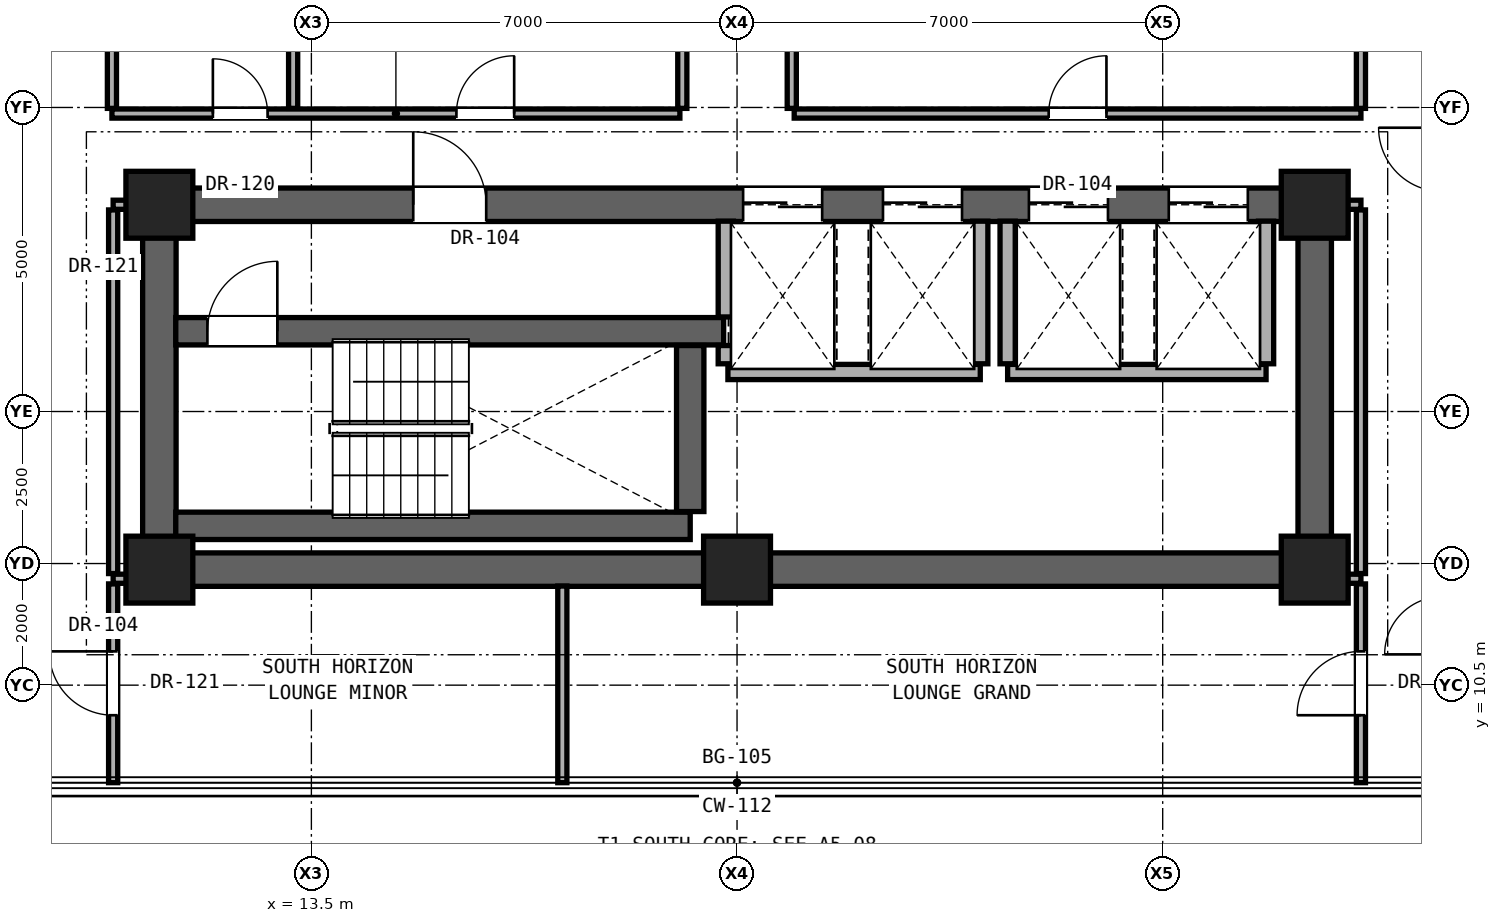
"""IFC4 building model, lengths in metres.
Left out: names, types, materials, properties, quantities, classifications, styles, units other than length and angle.
Written with IfcOpenShell. Run it as: python <this file> out.ifc"""

import sys

from ifc_helpers import new_model, si_unit, direction, frame, frame_2d, origin, origin_2d, place, context, subcontext, project, spatial, rectangle, extrude, element, fill, save


model = new_model("IFC4")
c1 = context("Model", 3, precision=1e-05, world=origin(), true_north=direction((0.0, 1.0)))
c2 = subcontext(c1, "Body", "Model", "MODEL_VIEW")
j1 = project(units=[si_unit("LENGTHUNIT", "METRE"), si_unit("PLANEANGLEUNIT", "RADIAN")], contexts=[c1])
p1 = place(None, origin())
s1 = spatial("IfcSite", under=j1, at=p1, CompositionType="ELEMENT")
p2 = place(p1, origin())
s2 = spatial("IfcBuilding", under=s1, at=p2, CompositionType="ELEMENT")
p3 = place(p2, frame((0.0, 0.0, 144.5)))
s3 = spatial("IfcBuildingStorey", under=s2, at=p3, CompositionType="ELEMENT", Elevation=144.5)
for number, where, z_axis, x_axis in (
    (1, (11.0, 12.4, 0.0), (0.0, 0.0, 1.0), (1.0, 0.0, 0.0)),
    (2, (20.5, 12.4, 0.0), (0.0, 0.0, 1.0), (1.0, 0.0, 0.0)),
    (3, (30.0, 12.4, 0.0), (0.0, 0.0, 1.0), (1.0, 0.0, 0.0)),
    (4, (11.0, 18.4, 0.0), (0.0, 0.0, 1.0), (1.0, 0.0, 0.0)),
    (5, (30.0, 18.4, 0.0), (0.0, 0.0, 1.0), (1.0, 0.0, 0.0)),
):
    element("IfcColumn", number, at=place(p3, frame(where, z_axis=z_axis, x_axis=x_axis)), inside=s3, PredefinedType="COLUMN", context=c2, shape_type="SweptSolid", body=[
        extrude(rectangle(XDim=1.1, YDim=1.1, at=origin_2d()), origin(), (0.0, 0.0, 1.0), 3.3),
    ])
p4 = place(p3, frame((11.0, 12.4, 0.0), z_axis=(0.0, 0.0, 1.0), x_axis=(1.0, 0.0, 0.0)))
e6 = element("IfcWall", 6, at=p4, inside=s3, PredefinedType="SHEAR", context=c2, shape_type="SweptSolid", body=[
    extrude(rectangle(XDim=19.0, YDim=0.55, at=frame_2d((9.5, 0.0))), origin(), (0.0, 0.0, 1.0), 2.94),
])
for number, where, z_axis, x_axis in (
    (7, (11.0, 12.4, 0.0), (0.0, 0.0, 1.0), (0.0, 1.0, 0.0)),
    (8, (30.0, 12.4, 0.0), (0.0, 0.0, 1.0), (0.0, 1.0, 0.0)),
):
    element("IfcWall", number, at=place(p3, frame(where, z_axis=z_axis, x_axis=x_axis)), inside=s3, PredefinedType="SHEAR", context=c2, shape_type="SweptSolid", body=[
        extrude(rectangle(XDim=6.0, YDim=0.55, at=frame_2d((3.0, 0.0))), origin(), (0.0, 0.0, 1.0), 2.94),
    ])
p5 = place(p3, frame((11.0, 18.4, 0.0), z_axis=(0.0, 0.0, 1.0), x_axis=(1.0, 0.0, 0.0)))
e9 = element("IfcWall", 9, at=p5, inside=s3, PredefinedType="SHEAR", context=c2, shape_type="SweptSolid", body=[
    extrude(rectangle(XDim=19.0, YDim=0.55, at=frame_2d((9.5, 0.0))), origin(), (0.0, 0.0, 1.0), 2.94),
])
p6 = place(p5, frame((4.175, 0.0, 0.0)))
e10 = element("IfcOpeningElement", 10, at=p6, cuts=e9, PredefinedType="OPENING", context=c2, shape_type="SweptSolid", body=[
    extrude(rectangle(XDim=1.2, YDim=2.25, at=frame_2d((0.6, 1.125))), frame((0.0, 0.285, 0.0), z_axis=(0.0, -1.0, 0.0), x_axis=(1.0, 0.0, 0.0)), (0.0, 0.0, 1.0), 0.57),
])
p7 = place(p5, frame((9.6, 0.0, 0.0)))
e11 = element("IfcOpeningElement", 11, at=p7, cuts=e9, PredefinedType="OPENING", context=c2, shape_type="SweptSolid", body=[
    extrude(rectangle(XDim=1.3, YDim=2.3, at=frame_2d((0.65, 1.15))), frame((0.0, 0.285, 0.0), z_axis=(0.0, -1.0, 0.0), x_axis=(1.0, 0.0, 0.0)), (0.0, 0.0, 1.0), 0.57),
])
p8 = place(p5, frame((11.9, 0.0, 0.0)))
e12 = element("IfcOpeningElement", 12, at=p8, cuts=e9, PredefinedType="OPENING", context=c2, shape_type="SweptSolid", body=[
    extrude(rectangle(XDim=1.3, YDim=2.3, at=frame_2d((0.65, 1.15))), frame((0.0, 0.285, 0.0), z_axis=(0.0, -1.0, 0.0), x_axis=(1.0, 0.0, 0.0)), (0.0, 0.0, 1.0), 0.57),
])
p9 = place(p5, frame((14.3, 0.0, 0.0)))
e13 = element("IfcOpeningElement", 13, at=p9, cuts=e9, PredefinedType="OPENING", context=c2, shape_type="SweptSolid", body=[
    extrude(rectangle(XDim=1.3, YDim=2.3, at=frame_2d((0.65, 1.15))), frame((0.0, 0.285, 0.0), z_axis=(0.0, -1.0, 0.0), x_axis=(1.0, 0.0, 0.0)), (0.0, 0.0, 1.0), 0.57),
])
p10 = place(p5, frame((16.6, 0.0, 0.0)))
e14 = element("IfcOpeningElement", 14, at=p10, cuts=e9, PredefinedType="OPENING", context=c2, shape_type="SweptSolid", body=[
    extrude(rectangle(XDim=1.3, YDim=2.3, at=frame_2d((0.65, 1.15))), frame((0.0, 0.285, 0.0), z_axis=(0.0, -1.0, 0.0), x_axis=(1.0, 0.0, 0.0)), (0.0, 0.0, 1.0), 0.57),
])
for number, where, z_axis, x_axis in (
    (15, (10.24, 12.25, 0.0), (0.0, 0.0, 1.0), (1.0, 0.0, 0.0)),
    (16, (30.27, 12.25, 0.0), (0.0, 0.0, 1.0), (1.0, 0.0, 0.0)),
):
    element("IfcWall", number, at=place(p3, frame(where, z_axis=z_axis, x_axis=x_axis)), inside=s3, PredefinedType="PARTITIONING", context=c2, shape_type="SweptSolid", body=[
        extrude(rectangle(XDim=0.49, YDim=0.15, at=frame_2d((0.245, 0.0))), origin(), (0.0, 0.0, 1.0), 2.94),
    ])
p11 = place(p3, frame((11.27, 13.12, 0.0), z_axis=(0.0, 0.0, 1.0), x_axis=(1.0, 0.0, 0.0)))
e17 = element("IfcWall", 17, at=p11, inside=s3, PredefinedType="SHEAR", context=c2, shape_type="SweptSolid", body=[
    extrude(rectangle(XDim=8.46, YDim=0.45, at=frame_2d((4.23, 0.0))), origin(), (0.0, 0.0, 1.0), 2.94),
])
p12 = place(p3, frame((20.35, 15.65, 0.0), z_axis=(0.0, 0.0, 1.0), x_axis=(1.0, 0.0, 0.0)))
e18 = element("IfcWall", 18, at=p12, inside=s3, PredefinedType="SOLIDWALL", context=c2, shape_type="SweptSolid", body=[
    extrude(rectangle(XDim=4.15, YDim=0.25, at=frame_2d((2.075, 0.0))), origin(), (0.0, 0.0, 1.0), 2.94),
])
p13 = place(p3, frame((24.95, 15.65, 0.0), z_axis=(0.0, 0.0, 1.0), x_axis=(1.0, 0.0, 0.0)))
e19 = element("IfcWall", 19, at=p13, inside=s3, PredefinedType="SOLIDWALL", context=c2, shape_type="SweptSolid", body=[
    extrude(rectangle(XDim=4.25, YDim=0.25, at=frame_2d((2.125, 0.0))), origin(), (0.0, 0.0, 1.0), 2.94),
])
p14 = place(p3, frame((11.27, 16.32, 0.0), z_axis=(0.0, 0.0, 1.0), x_axis=(1.0, 0.0, 0.0)))
e20 = element("IfcWall", 20, at=p14, inside=s3, PredefinedType="SHEAR", context=c2, shape_type="SweptSolid", body=[
    extrude(rectangle(XDim=9.01, YDim=0.45, at=frame_2d((4.505, 0.0))), origin(), (0.0, 0.0, 1.0), 2.94),
])
p15 = place(p14, frame((0.52, 0.0, 0.0)))
e21 = element("IfcOpeningElement", 21, at=p15, cuts=e20, PredefinedType="OPENING", context=c2, shape_type="SweptSolid", body=[
    extrude(rectangle(XDim=1.15, YDim=2.2, at=frame_2d((0.575, 1.1))), frame((0.0, 0.235, 0.0), z_axis=(0.0, -1.0, 0.0), x_axis=(1.0, 0.0, 0.0)), (0.0, 0.0, 1.0), 0.47),
])
for number, where, z_axis, x_axis in (
    (22, (10.24, 18.4, 0.0), (0.0, 0.0, 1.0), (1.0, 0.0, 0.0)),
    (23, (30.27, 18.4, 0.0), (0.0, 0.0, 1.0), (1.0, 0.0, 0.0)),
):
    element("IfcWall", number, at=place(p3, frame(where, z_axis=z_axis, x_axis=x_axis)), inside=s3, PredefinedType="PARTITIONING", context=c2, shape_type="SweptSolid", body=[
        extrude(rectangle(XDim=0.49, YDim=0.15, at=frame_2d((0.245, 0.0))), origin(), (0.0, 0.0, 1.0), 2.316),
    ])
p16 = place(p3, frame((10.22, 19.9, 0.0), z_axis=(0.0, 0.0, 1.0), x_axis=(1.0, 0.0, 0.0)))
e24 = element("IfcWall", 24, at=p16, inside=s3, PredefinedType="PARTITIONING", context=c2, shape_type="SweptSolid", body=[
    extrude(rectangle(XDim=9.34, YDim=0.15, at=frame_2d((4.67, 0.0))), origin(), (0.0, 0.0, 1.0), 2.316),
])
p17 = place(p16, frame((1.66, 0.0, 0.0)))
e25 = element("IfcOpeningElement", 25, at=p17, cuts=e24, PredefinedType="OPENING", context=c2, shape_type="SweptSolid", body=[
    extrude(rectangle(XDim=0.9, YDim=2.1, at=frame_2d((0.45, 1.05))), frame((0.0, 0.085, 0.0), z_axis=(0.0, -1.0, 0.0), x_axis=(1.0, 0.0, 0.0)), (0.0, 0.0, 1.0), 0.17),
])
p18 = place(p16, frame((5.665, 0.0, 0.0)))
e26 = element("IfcOpeningElement", 26, at=p18, cuts=e24, PredefinedType="OPENING", context=c2, shape_type="SweptSolid", body=[
    extrude(rectangle(XDim=0.95, YDim=2.15, at=frame_2d((0.475, 1.075))), frame((0.0, 0.085, 0.0), z_axis=(0.0, -1.0, 0.0), x_axis=(1.0, 0.0, 0.0)), (0.0, 0.0, 1.0), 0.17),
])
p19 = place(p3, frame((21.44, 19.9, 0.0), z_axis=(0.0, 0.0, 1.0), x_axis=(1.0, 0.0, 0.0)))
e27 = element("IfcWall", 27, at=p19, inside=s3, PredefinedType="PARTITIONING", context=c2, shape_type="SweptSolid", body=[
    extrude(rectangle(XDim=9.32, YDim=0.15, at=frame_2d((4.66, 0.0))), origin(), (0.0, 0.0, 1.0), 2.316),
])
p20 = place(p19, frame((4.185, 0.0, 0.0)))
e28 = element("IfcOpeningElement", 28, at=p20, cuts=e27, PredefinedType="OPENING", context=c2, shape_type="SweptSolid", body=[
    extrude(rectangle(XDim=0.95, YDim=2.15, at=frame_2d((0.475, 1.075))), frame((0.0, 0.085, 0.0), z_axis=(0.0, -1.0, 0.0), x_axis=(1.0, 0.0, 0.0)), (0.0, 0.0, 1.0), 0.17),
])
p21 = place(p3, frame((10.22, 19.985, 0.0), z_axis=(0.0, 0.0, 1.0), x_axis=(0.0, 1.0, 0.0)))
e29 = element("IfcWall", 29, at=p21, inside=s3, PredefinedType="PARTITIONING", context=c2, shape_type="SweptSolid", body=[
    extrude(rectangle(XDim=2.78, YDim=0.15, at=frame_2d((1.39, 0.0))), origin(), (0.0, 0.0, 1.0), 2.94),
])
p22 = place(p3, frame((10.24, 8.896, 0.0), z_axis=(0.0, 0.0, 1.0), x_axis=(0.0, 1.0, 0.0)))
e30 = element("IfcWall", 30, at=p22, inside=s3, PredefinedType="PARTITIONING", context=c2, shape_type="SweptSolid", body=[
    extrude(rectangle(XDim=3.269, YDim=0.15, at=frame_2d((1.635, 0.0))), origin(), (0.0, 0.0, 1.0), 2.94),
])
p23 = place(p22, frame((1.11, 0.0, 0.0)))
e31 = element("IfcOpeningElement", 31, at=p23, cuts=e30, PredefinedType="OPENING", context=c2, shape_type="SweptSolid", body=[
    extrude(rectangle(XDim=1.05, YDim=2.2, at=frame_2d((0.525, 1.1))), frame((0.0, 0.085, 0.0), z_axis=(0.0, -1.0, 0.0), x_axis=(1.0, 0.0, 0.0)), (0.0, 0.0, 1.0), 0.17),
])
p24 = place(p3, frame((10.24, 12.335, 0.0), z_axis=(0.0, 0.0, 1.0), x_axis=(0.0, 1.0, 0.0)))
e32 = element("IfcWall", 32, at=p24, inside=s3, PredefinedType="PARTITIONING", context=c2, shape_type="SweptSolid", body=[
    extrude(rectangle(XDim=5.98, YDim=0.15, at=frame_2d((2.99, 0.0))), origin(), (0.0, 0.0, 1.0), 2.316),
])
p25 = place(p3, frame((13.2, 19.985, 0.0), z_axis=(0.0, 0.0, 1.0), x_axis=(0.0, 1.0, 0.0)))
e33 = element("IfcWall", 33, at=p25, inside=s3, PredefinedType="PARTITIONING", context=c2, shape_type="SweptSolid", body=[
    extrude(rectangle(XDim=2.78, YDim=0.15, at=frame_2d((1.39, 0.0))), origin(), (0.0, 0.0, 1.0), 2.94),
])
p26 = place(p3, frame((17.627, 8.896, 0.0), z_axis=(0.0, 0.0, 1.0), x_axis=(0.0, 1.0, 0.0)))
e34 = element("IfcWall", 34, at=p26, inside=s3, PredefinedType="PARTITIONING", context=c2, shape_type="SweptSolid", body=[
    extrude(rectangle(XDim=3.234, YDim=0.15, at=frame_2d((1.617, 0.0))), origin(), (0.0, 0.0, 1.0), 2.94),
])
p27 = place(p3, frame((19.6, 19.985, 0.0), z_axis=(0.0, 0.0, 1.0), x_axis=(0.0, 1.0, 0.0)))
e35 = element("IfcWall", 35, at=p27, inside=s3, PredefinedType="PARTITIONING", context=c2, shape_type="SweptSolid", body=[
    extrude(rectangle(XDim=5.53, YDim=0.15, at=frame_2d((2.765, 0.0))), origin(), (0.0, 0.0, 1.0), 2.316),
])
p28 = place(p3, frame((19.73, 13.355, 0.0), z_axis=(0.0, 0.0, 1.0), x_axis=(0.0, 1.0, 0.0)))
e36 = element("IfcWall", 36, at=p28, inside=s3, PredefinedType="SHEAR", context=c2, shape_type="SweptSolid", body=[
    extrude(rectangle(XDim=2.73, YDim=0.45, at=frame_2d((1.365, 0.0))), origin(), (0.0, 0.0, 1.0), 2.94),
])
p29 = place(p3, frame((20.315, 15.785, 0.0), z_axis=(0.0, 0.0, 1.0), x_axis=(0.0, 1.0, 0.0)))
e37 = element("IfcWall", 37, at=p29, inside=s3, PredefinedType="SOLIDWALL", context=c2, shape_type="SweptSolid", body=[
    extrude(rectangle(XDim=0.3, YDim=0.25, at=frame_2d((0.15, 0.0))), origin(), (0.0, 0.0, 1.0), 2.94),
])
p30 = place(p3, frame((20.315, 16.555, 0.0), z_axis=(0.0, 0.0, 1.0), x_axis=(0.0, 1.0, 0.0)))
e38 = element("IfcWall", 38, at=p30, inside=s3, PredefinedType="SOLIDWALL", context=c2, shape_type="SweptSolid", body=[
    extrude(rectangle(XDim=1.575, YDim=0.25, at=frame_2d((0.788, 0.0))), origin(), (0.0, 0.0, 1.0), 2.94),
])
p31 = place(p3, frame((21.4, 19.985, 0.0), z_axis=(0.0, 0.0, 1.0), x_axis=(0.0, 1.0, 0.0)))
e39 = element("IfcWall", 39, at=p31, inside=s3, PredefinedType="PARTITIONING", context=c2, shape_type="SweptSolid", body=[
    extrude(rectangle(XDim=5.53, YDim=0.15, at=frame_2d((2.765, 0.0))), origin(), (0.0, 0.0, 1.0), 2.316),
])
for number, where, z_axis, x_axis in (
    (40, (24.5, 15.785, 0.0), (0.0, 0.0, 1.0), (0.0, 1.0, 0.0)),
    (41, (24.95, 15.785, 0.0), (0.0, 0.0, 1.0), (0.0, 1.0, 0.0)),
    (42, (29.2, 15.785, 0.0), (0.0, 0.0, 1.0), (0.0, 1.0, 0.0)),
):
    element("IfcWall", number, at=place(p3, frame(where, z_axis=z_axis, x_axis=x_axis)), inside=s3, PredefinedType="SOLIDWALL", context=c2, shape_type="SweptSolid", body=[
        extrude(rectangle(XDim=2.345, YDim=0.25, at=frame_2d((1.172, 0.0))), origin(), (0.0, 0.0, 1.0), 2.94),
    ])
p32 = place(p3, frame((30.76, 8.896, 0.0), z_axis=(0.0, 0.0, 1.0), x_axis=(0.0, 1.0, 0.0)))
e43 = element("IfcWall", 43, at=p32, inside=s3, PredefinedType="PARTITIONING", context=c2, shape_type="SweptSolid", body=[
    extrude(rectangle(XDim=3.269, YDim=0.15, at=frame_2d((1.635, 0.0))), origin(), (0.0, 0.0, 1.0), 2.94),
])
p33 = place(p32, frame((1.11, 0.0, 0.0)))
e44 = element("IfcOpeningElement", 44, at=p33, cuts=e43, PredefinedType="OPENING", context=c2, shape_type="SweptSolid", body=[
    extrude(rectangle(XDim=1.05, YDim=2.2, at=frame_2d((0.525, 1.1))), frame((0.0, 0.085, 0.0), z_axis=(0.0, -1.0, 0.0), x_axis=(1.0, 0.0, 0.0)), (0.0, 0.0, 1.0), 0.17),
])
p34 = place(p3, frame((30.76, 12.335, 0.0), z_axis=(0.0, 0.0, 1.0), x_axis=(0.0, 1.0, 0.0)))
e45 = element("IfcWall", 45, at=p34, inside=s3, PredefinedType="PARTITIONING", context=c2, shape_type="SweptSolid", body=[
    extrude(rectangle(XDim=5.98, YDim=0.15, at=frame_2d((2.99, 0.0))), origin(), (0.0, 0.0, 1.0), 2.316),
])
p35 = place(p3, frame((30.76, 19.985, 0.0), z_axis=(0.0, 0.0, 1.0), x_axis=(0.0, 1.0, 0.0)))
e46 = element("IfcWall", 46, at=p35, inside=s3, PredefinedType="PARTITIONING", context=c2, shape_type="SweptSolid", body=[
    extrude(rectangle(XDim=5.53, YDim=0.15, at=frame_2d((2.765, 0.0))), origin(), (0.0, 0.0, 1.0), 2.316),
])
p36 = place(p6, origin())
e47 = element("IfcDoor", 47, at=p36, inside=s3, OperationType="SINGLE_SWING_LEFT", PredefinedType="DOOR", context=c2, shape_type="SweptSolid", body=[
    extrude(rectangle(XDim=1.2, YDim=2.25, at=frame_2d((0.6, 1.125))), frame((0.0, 0.025, 0.0), z_axis=(0.0, -1.0, 0.0), x_axis=(1.0, 0.0, 0.0)), (0.0, 0.0, 1.0), 0.05),
])
fill(e10, e47)
p37 = place(p15, origin())
e48 = element("IfcDoor", 48, at=p37, inside=s3, OperationType="SINGLE_SWING_RIGHT", PredefinedType="DOOR", context=c2, shape_type="SweptSolid", body=[
    extrude(rectangle(XDim=1.15, YDim=2.2, at=frame_2d((0.575, 1.1))), frame((0.0, 0.025, 0.0), z_axis=(0.0, -1.0, 0.0), x_axis=(1.0, 0.0, 0.0)), (0.0, 0.0, 1.0), 0.05),
])
fill(e21, e48)
p38 = place(p17, origin())
e49 = element("IfcDoor", 49, at=p38, inside=s3, OperationType="SINGLE_SWING_LEFT", PredefinedType="DOOR", context=c2, shape_type="SweptSolid", body=[
    extrude(rectangle(XDim=0.9, YDim=2.1, at=frame_2d((0.45, 1.05))), frame((0.0, 0.025, 0.0), z_axis=(0.0, -1.0, 0.0), x_axis=(1.0, 0.0, 0.0)), (0.0, 0.0, 1.0), 0.05),
])
fill(e25, e49)
p39 = place(p18, origin())
e50 = element("IfcDoor", 50, at=p39, inside=s3, OperationType="SINGLE_SWING_RIGHT", PredefinedType="DOOR", context=c2, shape_type="SweptSolid", body=[
    extrude(rectangle(XDim=0.95, YDim=2.15, at=frame_2d((0.475, 1.075))), frame((0.0, 0.025, 0.0), z_axis=(0.0, -1.0, 0.0), x_axis=(1.0, 0.0, 0.0)), (0.0, 0.0, 1.0), 0.05),
])
fill(e26, e50)
p40 = place(p20, origin())
e51 = element("IfcDoor", 51, at=p40, inside=s3, OperationType="SINGLE_SWING_RIGHT", PredefinedType="DOOR", context=c2, shape_type="SweptSolid", body=[
    extrude(rectangle(XDim=0.95, YDim=2.15, at=frame_2d((0.475, 1.075))), frame((0.0, 0.025, 0.0), z_axis=(0.0, -1.0, 0.0), x_axis=(1.0, 0.0, 0.0)), (0.0, 0.0, 1.0), 0.05),
])
fill(e28, e51)
p41 = place(p23, origin())
e52 = element("IfcDoor", 52, at=p41, inside=s3, OperationType="SINGLE_SWING_RIGHT", PredefinedType="DOOR", context=c2, shape_type="SweptSolid", body=[
    extrude(rectangle(XDim=1.05, YDim=2.2, at=frame_2d((0.525, 1.1))), frame((0.0, 0.025, 0.0), z_axis=(0.0, -1.0, 0.0), x_axis=(1.0, 0.0, 0.0)), (0.0, 0.0, 1.0), 0.05),
])
fill(e31, e52)
p42 = place(p33, origin())
e53 = element("IfcDoor", 53, at=p42, inside=s3, OperationType="SINGLE_SWING_LEFT", PredefinedType="DOOR", context=c2, shape_type="SweptSolid", body=[
    extrude(rectangle(XDim=1.05, YDim=2.2, at=frame_2d((0.525, 1.1))), frame((0.0, 0.025, 0.0), z_axis=(0.0, -1.0, 0.0), x_axis=(1.0, 0.0, 0.0)), (0.0, 0.0, 1.0), 0.05),
])
fill(e44, e53)
p43 = place(p7, origin())
e54 = element("IfcDoor", 54, at=p43, inside=s3, OperationType="DOUBLE_DOOR_SLIDING", PredefinedType="DOOR", context=c2, shape_type="SweptSolid", body=[
    extrude(rectangle(XDim=1.3, YDim=2.3, at=frame_2d((0.65, 1.15))), frame((0.0, 0.025, 0.0), z_axis=(0.0, -1.0, 0.0), x_axis=(1.0, 0.0, 0.0)), (0.0, 0.0, 1.0), 0.05),
])
fill(e11, e54)
p44 = place(p8, origin())
e55 = element("IfcDoor", 55, at=p44, inside=s3, OperationType="DOUBLE_DOOR_SLIDING", PredefinedType="DOOR", context=c2, shape_type="SweptSolid", body=[
    extrude(rectangle(XDim=1.3, YDim=2.3, at=frame_2d((0.65, 1.15))), frame((0.0, 0.025, 0.0), z_axis=(0.0, -1.0, 0.0), x_axis=(1.0, 0.0, 0.0)), (0.0, 0.0, 1.0), 0.05),
])
fill(e12, e55)
p45 = place(p9, origin())
e56 = element("IfcDoor", 56, at=p45, inside=s3, OperationType="DOUBLE_DOOR_SLIDING", PredefinedType="DOOR", context=c2, shape_type="SweptSolid", body=[
    extrude(rectangle(XDim=1.3, YDim=2.3, at=frame_2d((0.65, 1.15))), frame((0.0, 0.025, 0.0), z_axis=(0.0, -1.0, 0.0), x_axis=(1.0, 0.0, 0.0)), (0.0, 0.0, 1.0), 0.05),
])
fill(e13, e56)
p46 = place(p10, origin())
e57 = element("IfcDoor", 57, at=p46, inside=s3, OperationType="DOUBLE_DOOR_SLIDING", PredefinedType="DOOR", context=c2, shape_type="SweptSolid", body=[
    extrude(rectangle(XDim=1.3, YDim=2.3, at=frame_2d((0.65, 1.15))), frame((0.0, 0.025, 0.0), z_axis=(0.0, -1.0, 0.0), x_axis=(1.0, 0.0, 0.0)), (0.0, 0.0, 1.0), 0.05),
])
fill(e14, e57)
save(model, sys.argv[1])
